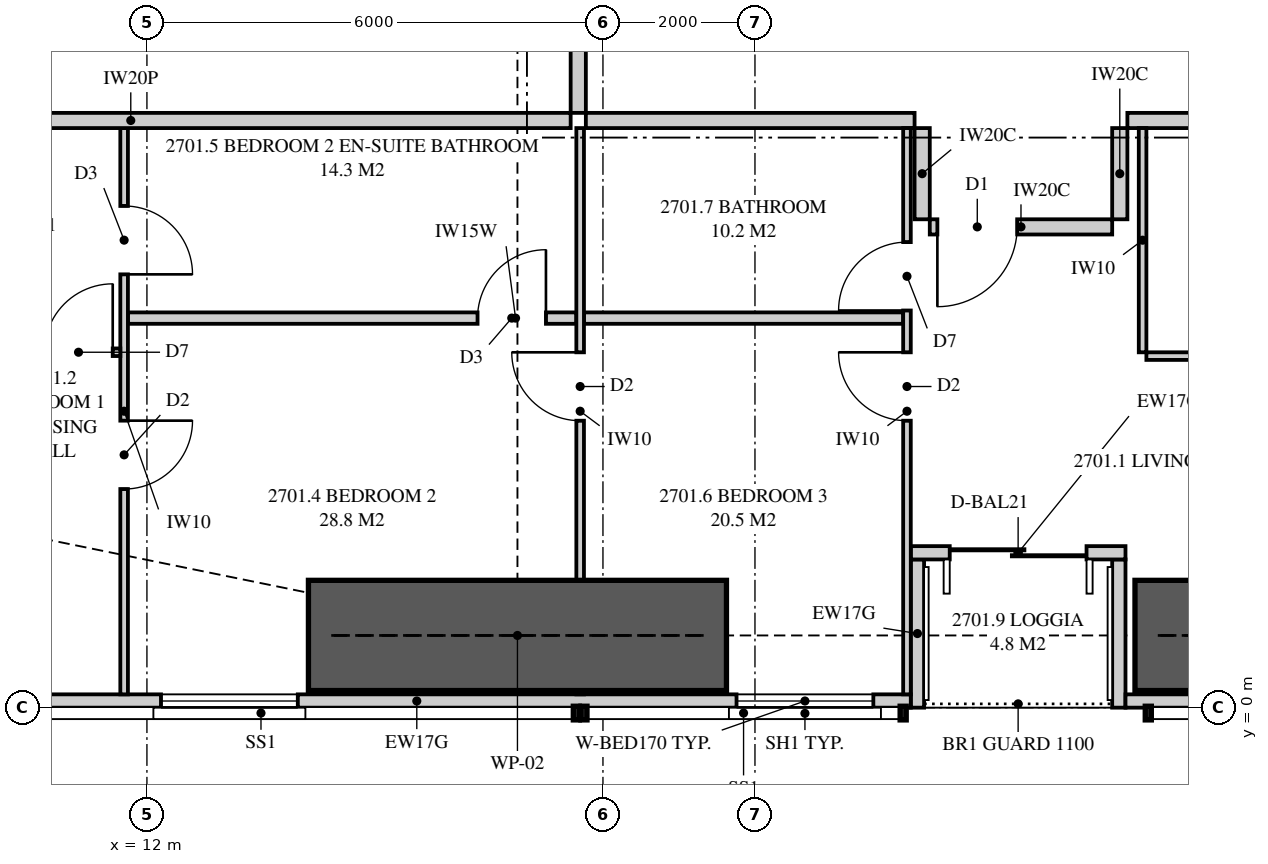
"""IFC4 building model, lengths in metres.
Left out: names, types, materials, properties, quantities, classifications, styles, units other than length and angle.
Written with IfcOpenShell. Run it as: python <this file> out.ifc"""

import sys

from ifc_helpers import new_model, si_unit, direction, frame, frame_2d, origin, place, context, subcontext, project, spatial, polyline, rectangle, outline, extrude, element, fill, save


model = new_model("IFC4")
c1 = context("Model", 3, precision=1e-05, world=origin(), true_north=direction((0.0, 1.0)))
c2 = subcontext(c1, "Body", "Model", "MODEL_VIEW")
j1 = project(units=[si_unit("LENGTHUNIT", "METRE"), si_unit("PLANEANGLEUNIT", "RADIAN")], contexts=[c1])
p1 = place(None, origin())
s1 = spatial("IfcSite", under=j1, at=p1, CompositionType="ELEMENT")
p2 = place(p1, origin())
s2 = spatial("IfcBuilding", under=s1, at=p2, CompositionType="ELEMENT")
p3 = place(p2, frame((0.0, 0.0, 101.5)))
s3 = spatial("IfcBuildingStorey", under=s2, at=p3, CompositionType="ELEMENT", Elevation=101.5)
p4 = place(p3, frame((9.051, 0.087, 0.0), z_axis=(0.0, 0.0, 1.0), x_axis=(1.0, 0.0, 0.0)))
e1 = element("IfcWall", 1, at=p4, inside=s3, PredefinedType="SOLIDWALL", context=c2, shape_type="SweptSolid", body=[
    extrude(outline(polyline([(0.0, 0.0), (12.999, 0.0), (12.999, 2.15), (7.824, 2.15), (7.824, 3.11), (7.666, 3.11), (7.666, 2.15), (7.62, 2.15), (7.62, 3.11), (0.0, 3.11), (0.0, 0.0)])), frame((0.0, 0.087, 0.0), z_axis=(0.0, -1.0, 0.0), x_axis=(1.0, 0.0, 0.0)), (0.0, 0.0, 1.0), 0.175),
])
p5 = place(p4, frame((3.134, 0.0, 0.4)))
e2 = element("IfcOpeningElement", 2, at=p5, cuts=e1, PredefinedType="OPENING", context=c2, shape_type="SweptSolid", body=[
    extrude(rectangle(XDim=1.8, YDim=1.7, at=frame_2d((0.9, 0.85))), frame((0.0, 0.097, 0.0), z_axis=(0.0, -1.0, 0.0), x_axis=(1.0, 0.0, 0.0)), (0.0, 0.0, 1.0), 0.195),
])
p6 = place(p4, frame((10.706, 0.0, 0.4)))
e3 = element("IfcOpeningElement", 3, at=p6, cuts=e1, PredefinedType="OPENING", context=c2, shape_type="SweptSolid", body=[
    extrude(rectangle(XDim=1.8, YDim=1.7, at=frame_2d((0.9, 0.85))), frame((0.0, 0.097, 0.0), z_axis=(0.0, -1.0, 0.0), x_axis=(1.0, 0.0, 0.0)), (0.0, 0.0, 1.0), 0.195),
])
p7 = place(p3, frame((24.875, 0.087, 0.0), z_axis=(0.0, 0.0, 1.0), x_axis=(1.0, 0.0, 0.0)))
e4 = element("IfcWall", 4, at=p7, inside=s3, PredefinedType="SOLIDWALL", context=c2, shape_type="SweptSolid", body=[
    extrude(rectangle(XDim=7.9, YDim=0.175, at=frame_2d((3.95, 0.0))), origin(), (0.0, 0.0, 1.0), 2.15),
])
p8 = place(p7, frame((5.725, 0.0, 0.4)))
e5 = element("IfcOpeningElement", 5, at=p8, cuts=e4, PredefinedType="OPENING", context=c2, shape_type="SweptSolid", body=[
    extrude(rectangle(XDim=1.8, YDim=1.7, at=frame_2d((0.9, 0.85))), frame((0.0, 0.097, 0.0), z_axis=(0.0, -1.0, 0.0), x_axis=(1.0, 0.0, 0.0)), (0.0, 0.0, 1.0), 0.195),
])
p9 = place(p3, frame((22.05, 2.038, 0.0), z_axis=(0.0, 0.0, 1.0), x_axis=(1.0, 0.0, 0.0)))
e6 = element("IfcWall", 6, at=p9, inside=s3, PredefinedType="SOLIDWALL", context=c2, shape_type="SweptSolid", body=[
    extrude(rectangle(XDim=2.825, YDim=0.175, at=frame_2d((1.413, 0.0))), origin(), (0.0, 0.0, 1.0), 3.11),
])
p10 = place(p9, frame((0.512, 0.0, 0.0)))
e7 = element("IfcOpeningElement", 7, at=p10, cuts=e6, PredefinedType="OPENING", context=c2, shape_type="SweptSolid", body=[
    extrude(rectangle(XDim=1.8, YDim=2.1, at=frame_2d((0.9, 1.05))), frame((0.0, 0.097, 0.0), z_axis=(0.0, -1.0, 0.0), x_axis=(1.0, 0.0, 0.0)), (0.0, 0.0, 1.0), 0.195),
])
for number, where, z_axis, x_axis in (
    (8, (22.137, 0.0, 0.0), (0.0, 0.0, 1.0), (0.0, 1.0, 0.0)),
    (9, (24.788, 0.0, 0.0), (0.0, 0.0, 1.0), (0.0, 1.0, 0.0)),
):
    element("IfcWall", number, at=place(p3, frame(where, z_axis=z_axis, x_axis=x_axis)), inside=s3, PredefinedType="SOLIDWALL", context=c2, shape_type="SweptSolid", body=[
        extrude(outline(polyline([(0.0, 0.0), (1.95, 0.0), (1.95, 3.11), (1.75, 3.11), (1.75, 2.15), (0.15, 2.15), (0.15, 3.11), (0.0, 3.11), (0.0, 0.0)])), frame((0.0, 0.087, 0.0), z_axis=(0.0, -1.0, 0.0), x_axis=(1.0, 0.0, 0.0)), (0.0, 0.0, 1.0), 0.175),
    ])
p11 = place(p3, frame((17.775, 7.725, 0.0), z_axis=(0.0, 0.0, 1.0), x_axis=(1.0, 0.0, 0.0)))
e10 = element("IfcWall", 10, at=p11, inside=s3, PredefinedType="PARTITIONING", context=c2, shape_type="SweptSolid", body=[
    extrude(rectangle(XDim=4.325, YDim=0.2, at=frame_2d((2.163, 0.0))), origin(), (0.0, 0.0, 1.0), 3.11),
])
p12 = place(p3, frame((11.7, 0.175, 0.0), z_axis=(0.0, 0.0, 1.0), x_axis=(0.0, 1.0, 0.0)))
e11 = element("IfcWall", 11, at=p12, inside=s3, PredefinedType="PARTITIONING", context=c2, shape_type="SweptSolid", body=[
    extrude(outline(polyline([(0.0, 0.0), (7.45, 0.0), (7.45, 3.11), (2.708, 3.11), (2.708, 2.15), (0.953, 2.15), (0.953, 3.11), (0.0, 3.11), (0.0, 0.0)])), frame((0.0, 0.05, 0.0), z_axis=(0.0, -1.0, 0.0), x_axis=(1.0, 0.0, 0.0)), (0.0, 0.0, 1.0), 0.1),
])
p13 = place(p12, frame((2.701, 0.0, 0.0)))
e12 = element("IfcOpeningElement", 12, at=p13, cuts=e11, PredefinedType="OPENING", context=c2, shape_type="SweptSolid", body=[
    extrude(rectangle(XDim=0.9, YDim=2.1, at=frame_2d((0.45, 1.05))), frame((0.0, 0.06, 0.0), z_axis=(0.0, -1.0, 0.0), x_axis=(1.0, 0.0, 0.0)), (0.0, 0.0, 1.0), 0.12),
])
p14 = place(p12, frame((5.525, 0.0, 0.0)))
e13 = element("IfcOpeningElement", 13, at=p14, cuts=e11, PredefinedType="OPENING", context=c2, shape_type="SweptSolid", body=[
    extrude(rectangle(XDim=0.9, YDim=2.1, at=frame_2d((0.45, 1.05))), frame((0.0, 0.06, 0.0), z_axis=(0.0, -1.0, 0.0), x_axis=(1.0, 0.0, 0.0)), (0.0, 0.0, 1.0), 0.12),
])
p15 = place(p3, frame((17.7, 0.175, 0.0), z_axis=(0.0, 0.0, 1.0), x_axis=(0.0, 1.0, 0.0)))
e14 = element("IfcWall", 14, at=p15, inside=s3, PredefinedType="PARTITIONING", context=c2, shape_type="SweptSolid", body=[
    extrude(outline(polyline([(1.635, 2.15), (0.0, 2.15), (0.0, 0.0), (7.45, 0.0), (7.45, 3.11), (1.635, 3.11), (1.635, 2.15)]), holes=[polyline([(1.021, 0.116), (0.529, 0.116), (0.529, 0.906), (1.021, 0.906), (1.021, 0.116)]), polyline([(1.021, 1.244), (0.529, 1.244), (0.529, 2.034), (1.021, 2.034), (1.021, 1.244)])]), frame((0.0, 0.05, 0.0), z_axis=(0.0, -1.0, 0.0), x_axis=(1.0, 0.0, 0.0)), (0.0, 0.0, 1.0), 0.1),
])
p16 = place(p15, frame((3.6, 0.0, 0.0)))
e15 = element("IfcOpeningElement", 15, at=p16, cuts=e14, PredefinedType="OPENING", context=c2, shape_type="SweptSolid", body=[
    extrude(rectangle(XDim=0.9, YDim=2.1, at=frame_2d((0.45, 1.05))), frame((0.0, 0.06, 0.0), z_axis=(0.0, -1.0, 0.0), x_axis=(1.0, 0.0, 0.0)), (0.0, 0.0, 1.0), 0.12),
])
p17 = place(p3, frame((22.0, 0.175, 0.0), z_axis=(0.0, 0.0, 1.0), x_axis=(0.0, 1.0, 0.0)))
e16 = element("IfcWall", 16, at=p17, inside=s3, PredefinedType="PARTITIONING", context=c2, shape_type="SweptSolid", body=[
    extrude(outline(polyline([(0.0, 0.0), (7.45, 0.0), (7.45, 3.11), (1.635, 3.11), (1.635, 2.15), (0.0, 2.15), (0.0, 3.11), (0.0, 0.0)])), frame((0.0, 0.05, 0.0), z_axis=(0.0, -1.0, 0.0), x_axis=(1.0, 0.0, 0.0)), (0.0, 0.0, 1.0), 0.1),
])
p18 = place(p17, frame((3.6, 0.0, 0.0)))
e17 = element("IfcOpeningElement", 17, at=p18, cuts=e16, PredefinedType="OPENING", context=c2, shape_type="SweptSolid", body=[
    extrude(rectangle(XDim=0.9, YDim=2.1, at=frame_2d((0.45, 1.05))), frame((0.0, 0.06, 0.0), z_axis=(0.0, -1.0, 0.0), x_axis=(1.0, 0.0, 0.0)), (0.0, 0.0, 1.0), 0.12),
])
p19 = place(p17, frame((5.05, 0.0, 0.0)))
e18 = element("IfcOpeningElement", 18, at=p19, cuts=e16, PredefinedType="OPENING", context=c2, shape_type="SweptSolid", body=[
    extrude(rectangle(XDim=0.9, YDim=2.1, at=frame_2d((0.45, 1.05))), frame((0.0, 0.06, 0.0), z_axis=(0.0, -1.0, 0.0), x_axis=(1.0, 0.0, 0.0)), (0.0, 0.0, 1.0), 0.12),
])
p20 = place(p3, frame((6.0, 4.676, 0.0), z_axis=(0.0, 0.0, 1.0), x_axis=(1.0, 0.0, 0.0)))
e19 = element("IfcWall", 19, at=p20, inside=s3, PredefinedType="PARTITIONING", context=c2, shape_type="SweptSolid", body=[
    extrude(outline(polyline([(0.0, 0.0), (5.65, 0.0), (5.65, 3.11), (5.46, 3.11), (5.46, 2.51), (3.171, 2.51), (3.171, 2.15), (1.429, 2.15), (1.429, 3.11), (0.0, 3.11), (0.0, 0.0)])), frame((0.0, 0.05, 0.0), z_axis=(0.0, -1.0, 0.0), x_axis=(1.0, 0.0, 0.0)), (0.0, 0.0, 1.0), 0.1),
])
p21 = place(p20, frame((4.65, 0.0, 0.0)))
e20 = element("IfcOpeningElement", 20, at=p21, cuts=e19, PredefinedType="OPENING", context=c2, shape_type="SweptSolid", body=[
    extrude(rectangle(XDim=0.9, YDim=2.1, at=frame_2d((0.45, 1.05))), frame((0.0, 0.06, 0.0), z_axis=(0.0, -1.0, 0.0), x_axis=(1.0, 0.0, 0.0)), (0.0, 0.0, 1.0), 0.12),
])
p22 = place(p3, frame((11.75, 5.125, 0.0), z_axis=(0.0, 0.0, 1.0), x_axis=(1.0, 0.0, 0.0)))
e21 = element("IfcWall", 21, at=p22, inside=s3, PredefinedType="PLUMBINGWALL", context=c2, shape_type="SweptSolid", body=[
    extrude(outline(polyline([(0.0, 0.0), (5.9, 0.0), (5.9, 3.11), (5.438, 3.11), (5.438, 2.541), (4.812, 2.541), (4.812, 3.11), (0.0, 3.11), (0.0, 0.0)])), frame((0.0, 0.075, 0.0), z_axis=(0.0, -1.0, 0.0), x_axis=(1.0, 0.0, 0.0)), (0.0, 0.0, 1.0), 0.15),
])
p23 = place(p22, frame((4.6, 0.0, 0.0)))
e22 = element("IfcOpeningElement", 22, at=p23, cuts=e21, PredefinedType="OPENING", context=c2, shape_type="SweptSolid", body=[
    extrude(rectangle(XDim=0.9, YDim=2.1, at=frame_2d((0.45, 1.05))), frame((0.0, 0.085, 0.0), z_axis=(0.0, -1.0, 0.0), x_axis=(1.0, 0.0, 0.0)), (0.0, 0.0, 1.0), 0.17),
])
p24 = place(p3, frame((17.75, 5.125, 0.0), z_axis=(0.0, 0.0, 1.0), x_axis=(1.0, 0.0, 0.0)))
e23 = element("IfcWall", 23, at=p24, inside=s3, PredefinedType="PLUMBINGWALL", context=c2, shape_type="SweptSolid", body=[
    extrude(rectangle(XDim=4.2, YDim=0.15, at=frame_2d((2.1, 0.0))), origin(), (0.0, 0.0, 1.0), 3.11),
])
p25 = place(p3, frame((25.15, 4.625, 0.0), z_axis=(0.0, 0.0, 1.0), x_axis=(1.0, 0.0, 0.0)))
e24 = element("IfcWall", 24, at=p25, inside=s3, PredefinedType="PARTITIONING", context=c2, shape_type="SweptSolid", body=[
    extrude(outline(polyline([(0.0, 0.0), (3.55, 0.0), (3.55, 3.11), (2.887, 3.11), (2.887, 2.541), (2.312, 2.541), (2.312, 3.11), (0.0, 3.11), (0.0, 0.0)])), frame((0.0, 0.05, 0.0), z_axis=(0.0, -1.0, 0.0), x_axis=(1.0, 0.0, 0.0)), (0.0, 0.0, 1.0), 0.1),
])
p26 = place(p25, frame((1.3, 0.0, 0.0)))
e25 = element("IfcOpeningElement", 25, at=p26, cuts=e24, PredefinedType="OPENING", context=c2, shape_type="SweptSolid", body=[
    extrude(rectangle(XDim=0.9, YDim=2.1, at=frame_2d((0.45, 1.05))), frame((0.0, 0.06, 0.0), z_axis=(0.0, -1.0, 0.0), x_axis=(1.0, 0.0, 0.0)), (0.0, 0.0, 1.0), 0.12),
])
p27 = place(p3, frame((25.1, 4.675, 0.0), z_axis=(0.0, 0.0, 1.0), x_axis=(0.0, 1.0, 0.0)))
e26 = element("IfcWall", 26, at=p27, inside=s3, PredefinedType="PARTITIONING", context=c2, shape_type="SweptSolid", body=[
    extrude(rectangle(XDim=2.95, YDim=0.1, at=frame_2d((1.475, 0.0))), origin(), (0.0, 0.0, 1.0), 3.11),
])
p28 = place(p3, frame((6.0, 7.725, 0.0), z_axis=(0.0, 0.0, 1.0), x_axis=(1.0, 0.0, 0.0)))
e27 = element("IfcWall", 27, at=p28, inside=s3, PredefinedType="PARTITIONING", context=c2, shape_type="SweptSolid", body=[
    extrude(outline(polyline([(0.0, 0.0), (11.575, 0.0), (11.575, 3.11), (11.212, 3.11), (11.212, 2.541), (10.538, 2.541), (10.538, 3.11), (5.51, 3.11), (5.51, 2.51), (2.969, 2.51), (2.969, 2.541), (2.727, 2.541), (2.727, 2.15), (0.884, 2.15), (0.884, 3.11), (0.0, 3.11), (0.0, 0.0)])), frame((0.0, 0.1, 0.0), z_axis=(0.0, -1.0, 0.0), x_axis=(1.0, 0.0, 0.0)), (0.0, 0.0, 1.0), 0.2),
])
p29 = place(p3, frame((17.675, 7.825, 0.0), z_axis=(0.0, 0.0, 1.0), x_axis=(0.0, 1.0, 0.0)))
e28 = element("IfcWall", 28, at=p29, inside=s3, PredefinedType="PARTITIONING", context=c2, shape_type="SweptSolid", body=[
    extrude(outline(polyline([(0.0, 0.0), (5.825, 0.0), (5.825, 3.11), (3.087, 3.11), (3.087, 2.541), (2.413, 2.541), (2.413, 3.11), (0.0, 3.11), (0.0, 0.0)])), frame((0.0, 0.1, 0.0), z_axis=(0.0, -1.0, 0.0), x_axis=(1.0, 0.0, 0.0)), (0.0, 0.0, 1.0), 0.2),
])
p30 = place(p29, frame((2.337, 0.0, 0.0)))
e29 = element("IfcOpeningElement", 29, at=p30, cuts=e28, PredefinedType="OPENING", context=c2, shape_type="SweptSolid", body=[
    extrude(rectangle(XDim=1.8, YDim=2.1, at=frame_2d((0.9, 1.05))), frame((0.0, 0.11, 0.0), z_axis=(0.0, -1.0, 0.0), x_axis=(1.0, 0.0, 0.0)), (0.0, 0.0, 1.0), 0.22),
])
p31 = place(p3, frame((24.9, 7.725, 0.0), z_axis=(0.0, 0.0, 1.0), x_axis=(1.0, 0.0, 0.0)))
e30 = element("IfcWall", 30, at=p31, inside=s3, PredefinedType="PARTITIONING", context=c2, shape_type="SweptSolid", body=[
    extrude(outline(polyline([(0.0, 0.0), (3.8, 0.0), (3.8, 3.11), (3.187, 3.11), (3.187, 2.541), (2.513, 2.541), (2.513, 3.11), (0.0, 3.11), (0.0, 0.0)])), frame((0.0, 0.1, 0.0), z_axis=(0.0, -1.0, 0.0), x_axis=(1.0, 0.0, 0.0)), (0.0, 0.0, 1.0), 0.2),
])
p32 = place(p3, frame((22.3, 6.325, 0.0), z_axis=(0.0, 0.0, 1.0), x_axis=(1.0, 0.0, 0.0)))
e31 = element("IfcWall", 31, at=p32, inside=s3, PredefinedType="PARTITIONING", context=c2, shape_type="SweptSolid", body=[
    extrude(rectangle(XDim=2.4, YDim=0.2, at=frame_2d((1.2, 0.0))), origin(), (0.0, 0.0, 1.0), 3.11),
])
p33 = place(p32, frame((0.1, 0.0, 0.0)))
e32 = element("IfcOpeningElement", 32, at=p33, cuts=e31, PredefinedType="OPENING", context=c2, shape_type="SweptSolid", body=[
    extrude(rectangle(XDim=1.05, YDim=2.2, at=frame_2d((0.525, 1.1))), frame((0.0, 0.11, 0.0), z_axis=(0.0, -1.0, 0.0), x_axis=(1.0, 0.0, 0.0)), (0.0, 0.0, 1.0), 0.22),
])
for number, where, z_axis, x_axis in (
    (33, (22.2, 7.625, 0.0), (0.0, 0.0, 1.0), (0.0, -1.0, 0.0)),
    (34, (24.8, 7.625, 0.0), (0.0, 0.0, 1.0), (0.0, -1.0, 0.0)),
):
    element("IfcWall", number, at=place(p3, frame(where, z_axis=z_axis, x_axis=x_axis)), inside=s3, PredefinedType="PARTITIONING", context=c2, shape_type="SweptSolid", body=[
        extrude(rectangle(XDim=1.2, YDim=0.2, at=frame_2d((0.6, 0.0))), origin(), (0.0, 0.0, 1.0), 3.11),
    ])
for number, where, z_axis, x_axis in (
    (35, (14.125, 0.95, 0.0), (0.0, 0.0, 1.0), (1.0, 0.0, 0.0)),
    (36, (25.0, 0.95, 0.0), (0.0, 0.0, 1.0), (1.0, 0.0, 0.0)),
):
    element("IfcWall", number, at=place(p3, frame(where, z_axis=z_axis, x_axis=x_axis)), inside=s3, PredefinedType="SHEAR", context=c2, shape_type="SweptSolid", body=[
        extrude(rectangle(XDim=5.5, YDim=1.45, at=frame_2d((2.75, 0.0))), origin(), (0.0, 0.0, 1.0), 3.35),
    ])
p34 = place(p5, origin())
e37 = element("IfcWindow", 37, at=p34, inside=s3, PartitioningType="SINGLE_PANEL", PredefinedType="WINDOW", context=c2, shape_type="SweptSolid", body=[
    extrude(rectangle(XDim=1.8, YDim=1.7, at=frame_2d((0.9, 0.85))), frame((0.0, 0.03, 0.0), z_axis=(0.0, -1.0, 0.0), x_axis=(1.0, 0.0, 0.0)), (0.0, 0.0, 1.0), 0.06),
])
fill(e2, e37)
p35 = place(p6, origin())
e38 = element("IfcWindow", 38, at=p35, inside=s3, PartitioningType="SINGLE_PANEL", PredefinedType="WINDOW", context=c2, shape_type="SweptSolid", body=[
    extrude(rectangle(XDim=1.8, YDim=1.7, at=frame_2d((0.9, 0.85))), frame((0.0, 0.03, 0.0), z_axis=(0.0, -1.0, 0.0), x_axis=(1.0, 0.0, 0.0)), (0.0, 0.0, 1.0), 0.06),
])
fill(e3, e38)
p36 = place(p10, origin())
e39 = element("IfcDoor", 39, at=p36, inside=s3, OperationType="SLIDING_TO_LEFT", PredefinedType="DOOR", context=c2, shape_type="SweptSolid", body=[
    extrude(rectangle(XDim=1.8, YDim=2.1, at=frame_2d((0.9, 1.05))), frame((0.0, 0.025, 0.0), z_axis=(0.0, -1.0, 0.0), x_axis=(1.0, 0.0, 0.0)), (0.0, 0.0, 1.0), 0.05),
])
fill(e7, e39)
p37 = place(p33, frame((1.05, 0.0, 0.0), z_axis=(0.0, 0.0, 1.0), x_axis=(-1.0, 0.0, 0.0)))
e40 = element("IfcDoor", 40, at=p37, inside=s3, OperationType="SINGLE_SWING_RIGHT", PredefinedType="DOOR", context=c2, shape_type="SweptSolid", body=[
    extrude(rectangle(XDim=1.05, YDim=2.2, at=frame_2d((0.525, 1.1))), frame((0.0, 0.025, 0.0), z_axis=(0.0, -1.0, 0.0), x_axis=(1.0, 0.0, 0.0)), (0.0, 0.0, 1.0), 0.05),
])
fill(e32, e40)
p38 = place(p21, origin())
e41 = element("IfcDoor", 41, at=p38, inside=s3, OperationType="SINGLE_SWING_RIGHT", PredefinedType="DOOR", context=c2, shape_type="SweptSolid", body=[
    extrude(rectangle(XDim=0.9, YDim=2.1, at=frame_2d((0.45, 1.05))), frame((0.0, 0.025, 0.0), z_axis=(0.0, -1.0, 0.0), x_axis=(1.0, 0.0, 0.0)), (0.0, 0.0, 1.0), 0.05),
])
fill(e20, e41)
p39 = place(p13, frame((0.9, 0.0, 0.0), z_axis=(0.0, 0.0, 1.0), x_axis=(-1.0, 0.0, 0.0)))
e42 = element("IfcDoor", 42, at=p39, inside=s3, OperationType="SINGLE_SWING_LEFT", PredefinedType="DOOR", context=c2, shape_type="SweptSolid", body=[
    extrude(rectangle(XDim=0.9, YDim=2.1, at=frame_2d((0.45, 1.05))), frame((0.0, 0.025, 0.0), z_axis=(0.0, -1.0, 0.0), x_axis=(1.0, 0.0, 0.0)), (0.0, 0.0, 1.0), 0.05),
])
fill(e12, e42)
p40 = place(p16, origin())
e43 = element("IfcDoor", 43, at=p40, inside=s3, OperationType="SINGLE_SWING_RIGHT", PredefinedType="DOOR", context=c2, shape_type="SweptSolid", body=[
    extrude(rectangle(XDim=0.9, YDim=2.1, at=frame_2d((0.45, 1.05))), frame((0.0, 0.025, 0.0), z_axis=(0.0, -1.0, 0.0), x_axis=(1.0, 0.0, 0.0)), (0.0, 0.0, 1.0), 0.05),
])
fill(e15, e43)
p41 = place(p23, origin())
e44 = element("IfcDoor", 44, at=p41, inside=s3, OperationType="SINGLE_SWING_RIGHT", PredefinedType="DOOR", context=c2, shape_type="SweptSolid", body=[
    extrude(rectangle(XDim=0.9, YDim=2.1, at=frame_2d((0.45, 1.05))), frame((0.0, 0.025, 0.0), z_axis=(0.0, -1.0, 0.0), x_axis=(1.0, 0.0, 0.0)), (0.0, 0.0, 1.0), 0.05),
])
fill(e22, e44)
p42 = place(p18, origin())
e45 = element("IfcDoor", 45, at=p42, inside=s3, OperationType="SINGLE_SWING_RIGHT", PredefinedType="DOOR", context=c2, shape_type="SweptSolid", body=[
    extrude(rectangle(XDim=0.9, YDim=2.1, at=frame_2d((0.45, 1.05))), frame((0.0, 0.025, 0.0), z_axis=(0.0, -1.0, 0.0), x_axis=(1.0, 0.0, 0.0)), (0.0, 0.0, 1.0), 0.05),
])
fill(e17, e45)
p43 = place(p19, origin())
e46 = element("IfcDoor", 46, at=p43, inside=s3, OperationType="SINGLE_SWING_LEFT", PredefinedType="DOOR", context=c2, shape_type="SweptSolid", body=[
    extrude(rectangle(XDim=0.9, YDim=2.1, at=frame_2d((0.45, 1.05))), frame((0.0, 0.025, 0.0), z_axis=(0.0, -1.0, 0.0), x_axis=(1.0, 0.0, 0.0)), (0.0, 0.0, 1.0), 0.05),
])
fill(e18, e46)
p44 = place(p14, frame((0.9, 0.0, 0.0), z_axis=(0.0, 0.0, 1.0), x_axis=(-1.0, 0.0, 0.0)))
e47 = element("IfcDoor", 47, at=p44, inside=s3, OperationType="SINGLE_SWING_RIGHT", PredefinedType="DOOR", context=c2, shape_type="SweptSolid", body=[
    extrude(rectangle(XDim=0.9, YDim=2.1, at=frame_2d((0.45, 1.05))), frame((0.0, 0.025, 0.0), z_axis=(0.0, -1.0, 0.0), x_axis=(1.0, 0.0, 0.0)), (0.0, 0.0, 1.0), 0.05),
])
fill(e13, e47)
save(model, sys.argv[1])
